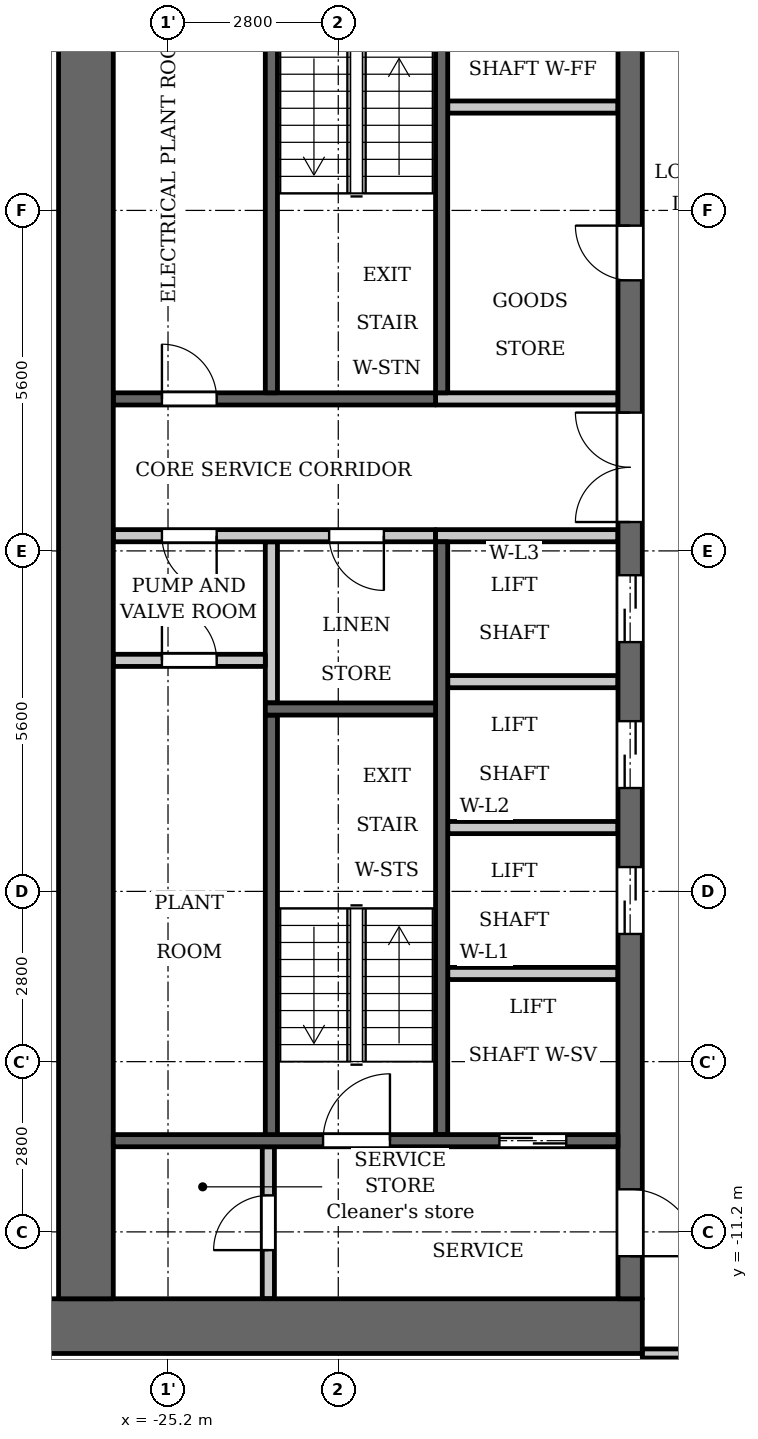
"""IFC4 building model, lengths in metres.
Left out: names, types, materials, properties, quantities, classifications, styles, units other than length and angle.
Written with IfcOpenShell. Run it as: python <this file> out.ifc"""

import sys

from ifc_helpers import new_model, si_unit, direction, frame, frame_2d, origin, place, context, subcontext, project, spatial, rectangle, extrude, element, fill, save


model = new_model("IFC4")
c1 = context("Model", 3, precision=1e-05, world=origin(), true_north=direction((0.0, 1.0)))
c2 = subcontext(c1, "Body", "Model", "MODEL_VIEW")
j1 = project(units=[si_unit("LENGTHUNIT", "METRE"), si_unit("PLANEANGLEUNIT", "RADIAN")], contexts=[c1])
p1 = place(None, origin())
s1 = spatial("IfcSite", under=j1, at=p1, CompositionType="ELEMENT")
p2 = place(p1, origin())
s2 = spatial("IfcBuilding", under=s1, at=p2, CompositionType="ELEMENT")
p3 = place(p2, frame((0.0, 0.0, 37.5)))
s3 = spatial("IfcBuildingStorey", under=s2, at=p3, CompositionType="ELEMENT", Elevation=37.5)
p4 = place(p3, frame((-23.5, -2.5, 0.0), z_axis=(0.0, 0.0, 1.0), x_axis=(0.0, 1.0, 0.0)))
e1 = element("IfcWall", 1, at=p4, inside=s3, PredefinedType="PARTITIONING", context=c2, shape_type="SweptSolid", body=[
    extrude(rectangle(XDim=2.65, YDim=0.2, at=frame_2d((1.325, 0.0))), origin(), (0.0, 0.0, 1.0), 3.2),
])
p5 = place(p3, frame((-20.7, 2.6, 0.0), z_axis=(0.0, 0.0, 1.0), x_axis=(0.0, 1.0, 0.0)))
e2 = element("IfcWall", 2, at=p5, inside=s3, PredefinedType="SHEAR", context=c2, shape_type="SweptSolid", body=[
    extrude(rectangle(XDim=7.0, YDim=0.2, at=frame_2d((3.5, 0.0))), origin(), (0.0, 0.0, 1.0), 3.2),
])
p6 = place(p3, frame((-20.7, -9.6, 0.0), z_axis=(0.0, 0.0, 1.0), x_axis=(0.0, 1.0, 0.0)))
e3 = element("IfcWall", 3, at=p6, inside=s3, PredefinedType="SHEAR", context=c2, shape_type="SweptSolid", body=[
    extrude(rectangle(XDim=9.75, YDim=0.2, at=frame_2d((4.875, 0.0))), origin(), (0.0, 0.0, 1.0), 3.2),
])
p7 = place(p3, frame((-20.8, 2.5, 0.0), z_axis=(0.0, 0.0, 1.0), x_axis=(-1.0, 0.0, 0.0)))
e4 = element("IfcWall", 4, at=p7, inside=s3, PredefinedType="SHEAR", context=c2, shape_type="SweptSolid", body=[
    extrude(rectangle(XDim=5.3, YDim=0.2, at=frame_2d((2.65, 0.0))), origin(), (0.0, 0.0, 1.0), 3.2),
])
p8 = place(p7, frame((3.6, 0.0, 0.0)))
e5 = element("IfcOpeningElement", 5, at=p8, cuts=e4, PredefinedType="OPENING", context=c2, shape_type="SweptSolid", body=[
    extrude(rectangle(XDim=0.9, YDim=2.1, at=frame_2d((0.45, 1.05))), frame((0.0, 0.11, 0.0), z_axis=(0.0, -1.0, 0.0), x_axis=(1.0, 0.0, 0.0)), (0.0, 0.0, 1.0), 0.22),
])
p9 = place(p3, frame((-20.8, 0.25, 0.0), z_axis=(0.0, 0.0, 1.0), x_axis=(-1.0, 0.0, 0.0)))
e6 = element("IfcWall", 6, at=p9, inside=s3, PredefinedType="PARTITIONING", context=c2, shape_type="SweptSolid", body=[
    extrude(rectangle(XDim=5.3, YDim=0.2, at=frame_2d((2.65, 0.0))), origin(), (0.0, 0.0, 1.0), 3.2),
])
p10 = place(p9, frame((0.85, 0.0, 0.0)))
e7 = element("IfcOpeningElement", 7, at=p10, cuts=e6, PredefinedType="OPENING", context=c2, shape_type="SweptSolid", body=[
    extrude(rectangle(XDim=0.9, YDim=2.1, at=frame_2d((0.45, 1.05))), frame((0.0, 0.11, 0.0), z_axis=(0.0, -1.0, 0.0), x_axis=(1.0, 0.0, 0.0)), (0.0, 0.0, 1.0), 0.22),
])
p11 = place(p9, frame((3.6, 0.0, 0.0)))
e8 = element("IfcOpeningElement", 8, at=p11, cuts=e6, PredefinedType="OPENING", context=c2, shape_type="SweptSolid", body=[
    extrude(rectangle(XDim=0.9, YDim=2.1, at=frame_2d((0.45, 1.05))), frame((0.0, 0.11, 0.0), z_axis=(0.0, -1.0, 0.0), x_axis=(1.0, 0.0, 0.0)), (0.0, 0.0, 1.0), 0.22),
])
p12 = place(p3, frame((-17.4, -12.75, 0.0), z_axis=(0.0, 0.0, 1.0), x_axis=(-1.0, 0.0, 0.0)))
e9 = element("IfcWall", 9, at=p12, inside=s3, PredefinedType="SHEAR", context=c2, shape_type="SweptSolid", body=[
    extrude(rectangle(XDim=10.4, YDim=0.9, at=frame_2d((5.2, 0.0))), origin(), (0.0, 0.0, 1.0), 3.2),
])
p13 = place(p3, frame((-17.6, -12.3, 0.0), z_axis=(0.0, 0.0, 1.0), x_axis=(0.0, 1.0, 0.0)))
e10 = element("IfcWall", 10, at=p13, inside=s3, PredefinedType="SHEAR", context=c2, shape_type="SweptSolid", body=[
    extrude(rectangle(XDim=24.6, YDim=0.4, at=frame_2d((12.3, 0.0))), origin(), (0.0, 0.0, 1.0), 3.2),
])
p14 = place(p13, frame((6.0, 0.0, 0.0)))
e11 = element("IfcOpeningElement", 11, at=p14, cuts=e10, PredefinedType="OPENING", context=c2, shape_type="SweptSolid", body=[
    extrude(rectangle(XDim=1.1, YDim=2.1, at=frame_2d((0.55, 1.05))), frame((0.0, 0.21, 0.0), z_axis=(0.0, -1.0, 0.0), x_axis=(1.0, 0.0, 0.0)), (0.0, 0.0, 1.0), 0.42),
])
p15 = place(p13, frame((8.4, 0.0, 0.0)))
e12 = element("IfcOpeningElement", 12, at=p15, cuts=e10, PredefinedType="OPENING", context=c2, shape_type="SweptSolid", body=[
    extrude(rectangle(XDim=1.1, YDim=2.1, at=frame_2d((0.55, 1.05))), frame((0.0, 0.21, 0.0), z_axis=(0.0, -1.0, 0.0), x_axis=(1.0, 0.0, 0.0)), (0.0, 0.0, 1.0), 0.42),
])
p16 = place(p13, frame((10.8, 0.0, 0.0)))
e13 = element("IfcOpeningElement", 13, at=p16, cuts=e10, PredefinedType="OPENING", context=c2, shape_type="SweptSolid", body=[
    extrude(rectangle(XDim=1.1, YDim=2.1, at=frame_2d((0.55, 1.05))), frame((0.0, 0.21, 0.0), z_axis=(0.0, -1.0, 0.0), x_axis=(1.0, 0.0, 0.0)), (0.0, 0.0, 1.0), 0.42),
])
p17 = place(p13, frame((16.75, 0.0, 0.0)))
e14 = element("IfcOpeningElement", 14, at=p17, cuts=e10, PredefinedType="OPENING", context=c2, shape_type="SweptSolid", body=[
    extrude(rectangle(XDim=0.9, YDim=2.1, at=frame_2d((0.45, 1.05))), frame((0.0, 0.21, 0.0), z_axis=(0.0, -1.0, 0.0), x_axis=(1.0, 0.0, 0.0)), (0.0, 0.0, 1.0), 0.42),
])
p18 = place(p13, frame((22.8, 0.0, 0.0)))
e15 = element("IfcOpeningElement", 15, at=p18, cuts=e10, PredefinedType="OPENING", context=c2, shape_type="SweptSolid", body=[
    extrude(rectangle(XDim=1.1, YDim=2.1, at=frame_2d((0.55, 1.05))), frame((0.0, 0.21, 0.0), z_axis=(0.0, -1.0, 0.0), x_axis=(1.0, 0.0, 0.0)), (0.0, 0.0, 1.0), 0.42),
])
p19 = place(p13, frame((0.7, 0.0, 0.0)))
e16 = element("IfcOpeningElement", 16, at=p19, cuts=e10, PredefinedType="OPENING", context=c2, shape_type="SweptSolid", body=[
    extrude(rectangle(XDim=1.1, YDim=2.1, at=frame_2d((0.55, 1.05))), frame((0.0, 0.21, 0.0), z_axis=(0.0, -1.0, 0.0), x_axis=(1.0, 0.0, 0.0)), (0.0, 0.0, 1.0), 0.42),
])
p20 = place(p13, frame((12.775, 0.0, 0.0)))
e17 = element("IfcOpeningElement", 17, at=p20, cuts=e10, PredefinedType="OPENING", context=c2, shape_type="SweptSolid", body=[
    extrude(rectangle(XDim=1.8, YDim=2.1, at=frame_2d((0.9, 1.05))), frame((0.0, 0.21, 0.0), z_axis=(0.0, -1.0, 0.0), x_axis=(1.0, 0.0, 0.0)), (0.0, 0.0, 1.0), 0.42),
])
p21 = place(p3, frame((-26.55, -12.3, 0.0), z_axis=(0.0, 0.0, 1.0), x_axis=(0.0, 1.0, 0.0)))
e18 = element("IfcWall", 18, at=p21, inside=s3, PredefinedType="SHEAR", context=c2, shape_type="SweptSolid", body=[
    extrude(rectangle(XDim=24.6, YDim=0.9, at=frame_2d((12.3, 0.0))), origin(), (0.0, 0.0, 1.0), 3.2),
])
p22 = place(p3, frame((-23.55, -12.3, 0.0), z_axis=(0.0, 0.0, 1.0), x_axis=(0.0, 1.0, 0.0)))
e19 = element("IfcWall", 19, at=p22, inside=s3, PredefinedType="PARTITIONING", context=c2, shape_type="SweptSolid", body=[
    extrude(rectangle(XDim=2.5, YDim=0.2, at=frame_2d((1.25, 0.0))), origin(), (0.0, 0.0, 1.0), 3.2),
])
p23 = place(p22, frame((0.8, 0.0, 0.0)))
e20 = element("IfcOpeningElement", 20, at=p23, cuts=e19, PredefinedType="OPENING", context=c2, shape_type="SweptSolid", body=[
    extrude(rectangle(XDim=0.9, YDim=2.1, at=frame_2d((0.45, 1.05))), frame((0.0, 0.11, 0.0), z_axis=(0.0, -1.0, 0.0), x_axis=(1.0, 0.0, 0.0)), (0.0, 0.0, 1.0), 0.22),
])
p24 = place(p3, frame((-23.6, -1.8, 0.0), z_axis=(0.0, 0.0, 1.0), x_axis=(-1.0, 0.0, 0.0)))
e21 = element("IfcWall", 21, at=p24, inside=s3, PredefinedType="PARTITIONING", context=c2, shape_type="SweptSolid", body=[
    extrude(rectangle(XDim=2.5, YDim=0.2, at=frame_2d((1.25, 0.0))), origin(), (0.0, 0.0, 1.0), 3.2),
])
p25 = place(p24, frame((0.8, 0.0, 0.0)))
e22 = element("IfcOpeningElement", 22, at=p25, cuts=e21, PredefinedType="OPENING", context=c2, shape_type="SweptSolid", body=[
    extrude(rectangle(XDim=0.9, YDim=2.1, at=frame_2d((0.45, 1.05))), frame((0.0, 0.11, 0.0), z_axis=(0.0, -1.0, 0.0), x_axis=(1.0, 0.0, 0.0)), (0.0, 0.0, 1.0), 0.22),
])
p26 = place(p3, frame((-17.8, -9.7, 0.0), z_axis=(0.0, 0.0, 1.0), x_axis=(-1.0, 0.0, 0.0)))
e23 = element("IfcWall", 23, at=p26, inside=s3, PredefinedType="SHEAR", context=c2, shape_type="SweptSolid", body=[
    extrude(rectangle(XDim=8.3, YDim=0.2, at=frame_2d((4.15, 0.0))), origin(), (0.0, 0.0, 1.0), 3.2),
])
p27 = place(p26, frame((0.85, 0.0, 0.0)))
e24 = element("IfcOpeningElement", 24, at=p27, cuts=e23, PredefinedType="OPENING", context=c2, shape_type="SweptSolid", body=[
    extrude(rectangle(XDim=1.1, YDim=2.1, at=frame_2d((0.55, 1.05))), frame((0.0, 0.11, 0.0), z_axis=(0.0, -1.0, 0.0), x_axis=(1.0, 0.0, 0.0)), (0.0, 0.0, 1.0), 0.22),
])
p28 = place(p26, frame((3.75, 0.0, 0.0)))
e25 = element("IfcOpeningElement", 25, at=p28, cuts=e23, PredefinedType="OPENING", context=c2, shape_type="SweptSolid", body=[
    extrude(rectangle(XDim=1.1, YDim=2.1, at=frame_2d((0.55, 1.05))), frame((0.0, 0.11, 0.0), z_axis=(0.0, -1.0, 0.0), x_axis=(1.0, 0.0, 0.0)), (0.0, 0.0, 1.0), 0.22),
])
for number, where, z_axis, x_axis in (
    (26, (-17.8, -6.95, 0.0), (0.0, 0.0, 1.0), (-1.0, 0.0, 0.0)),
    (27, (-17.8, -4.55, 0.0), (0.0, 0.0, 1.0), (-1.0, 0.0, 0.0)),
    (28, (-17.8, -2.15, 0.0), (0.0, 0.0, 1.0), (-1.0, 0.0, 0.0)),
):
    element("IfcWall", number, at=place(p3, frame(where, z_axis=z_axis, x_axis=x_axis)), inside=s3, PredefinedType="PARTITIONING", context=c2, shape_type="SweptSolid", body=[
        extrude(rectangle(XDim=2.8, YDim=0.2, at=frame_2d((1.4, 0.0))), origin(), (0.0, 0.0, 1.0), 3.2),
    ])
for number, where, z_axis, x_axis in (
    (29, (-17.8, 0.25, 0.0), (0.0, 0.0, 1.0), (-1.0, 0.0, 0.0)),
    (30, (-17.8, 2.5, 0.0), (0.0, 0.0, 1.0), (-1.0, 0.0, 0.0)),
):
    element("IfcWall", number, at=place(p3, frame(where, z_axis=z_axis, x_axis=x_axis)), inside=s3, PredefinedType="PARTITIONING", context=c2, shape_type="SweptSolid", body=[
        extrude(rectangle(XDim=3.0, YDim=0.2, at=frame_2d((1.5, 0.0))), origin(), (0.0, 0.0, 1.0), 3.2),
    ])
p29 = place(p3, frame((-17.8, 7.3, 0.0), z_axis=(0.0, 0.0, 1.0), x_axis=(-1.0, 0.0, 0.0)))
e31 = element("IfcWall", 31, at=p29, inside=s3, PredefinedType="PARTITIONING", context=c2, shape_type="SweptSolid", body=[
    extrude(rectangle(XDim=2.8, YDim=0.2, at=frame_2d((1.4, 0.0))), origin(), (0.0, 0.0, 1.0), 3.2),
])
p30 = place(p3, frame((-23.5, 2.6, 0.0), z_axis=(0.0, 0.0, 1.0), x_axis=(0.0, 1.0, 0.0)))
e32 = element("IfcWall", 32, at=p30, inside=s3, PredefinedType="SHEAR", context=c2, shape_type="SweptSolid", body=[
    extrude(rectangle(XDim=7.0, YDim=0.2, at=frame_2d((3.5, 0.0))), origin(), (0.0, 0.0, 1.0), 3.2),
])
p31 = place(p3, frame((-23.5, -9.6, 0.0), z_axis=(0.0, 0.0, 1.0), x_axis=(0.0, 1.0, 0.0)))
e33 = element("IfcWall", 33, at=p31, inside=s3, PredefinedType="SHEAR", context=c2, shape_type="SweptSolid", body=[
    extrude(rectangle(XDim=6.9, YDim=0.2, at=frame_2d((3.45, 0.0))), origin(), (0.0, 0.0, 1.0), 3.2),
])
p32 = place(p3, frame((-20.8, -2.6, 0.0), z_axis=(0.0, 0.0, 1.0), x_axis=(-1.0, 0.0, 0.0)))
e34 = element("IfcWall", 34, at=p32, inside=s3, PredefinedType="SHEAR", context=c2, shape_type="SweptSolid", body=[
    extrude(rectangle(XDim=2.8, YDim=0.2, at=frame_2d((1.4, 0.0))), origin(), (0.0, 0.0, 1.0), 3.2),
])
p33 = place(p3, frame((-17.4, -13.2, 0.0), z_axis=(0.0, 0.0, 1.0), x_axis=(1.0, 0.0, 0.0)))
e35 = element("IfcWall", 35, at=p33, inside=s3, PredefinedType="PARTITIONING", context=c2, shape_type="SweptSolid", body=[
    extrude(rectangle(XDim=34.8, YDim=0.15, at=frame_2d((17.4, 0.0))), origin(), (0.0, 0.0, 1.0), 3.2),
])
p34 = place(p33, frame((0.65, 0.0, 0.0)))
e36 = element("IfcOpeningElement", 36, at=p34, cuts=e35, PredefinedType="OPENING", context=c2, shape_type="SweptSolid", body=[
    extrude(rectangle(XDim=1.0, YDim=2.1, at=frame_2d((0.5, 1.05))), frame((0.0, 0.085, 0.0), z_axis=(0.0, -1.0, 0.0), x_axis=(1.0, 0.0, 0.0)), (0.0, 0.0, 1.0), 0.17),
])
p35 = place(p33, frame((33.05, 0.0, 0.0)))
e37 = element("IfcOpeningElement", 37, at=p35, cuts=e35, PredefinedType="OPENING", context=c2, shape_type="SweptSolid", body=[
    extrude(rectangle(XDim=1.0, YDim=2.1, at=frame_2d((0.5, 1.05))), frame((0.0, 0.085, 0.0), z_axis=(0.0, -1.0, 0.0), x_axis=(1.0, 0.0, 0.0)), (0.0, 0.0, 1.0), 0.17),
])
p36 = place(p33, frame((4.55, 0.0, 0.0)))
e38 = element("IfcOpeningElement", 38, at=p36, cuts=e35, PredefinedType="OPENING", context=c2, shape_type="SweptSolid", body=[
    extrude(rectangle(XDim=1.0, YDim=2.1, at=frame_2d((0.5, 1.05))), frame((0.0, 0.085, 0.0), z_axis=(0.0, -1.0, 0.0), x_axis=(1.0, 0.0, 0.0)), (0.0, 0.0, 1.0), 0.17),
])
p37 = place(p33, frame((6.9, 0.0, 0.0)))
e39 = element("IfcOpeningElement", 39, at=p37, cuts=e35, PredefinedType="OPENING", context=c2, shape_type="SweptSolid", body=[
    extrude(rectangle(XDim=1.0, YDim=2.1, at=frame_2d((0.5, 1.05))), frame((0.0, 0.085, 0.0), z_axis=(0.0, -1.0, 0.0), x_axis=(1.0, 0.0, 0.0)), (0.0, 0.0, 1.0), 0.17),
])
p38 = place(p33, frame((15.75, 0.0, 0.0)))
e40 = element("IfcOpeningElement", 40, at=p38, cuts=e35, PredefinedType="OPENING", context=c2, shape_type="SweptSolid", body=[
    extrude(rectangle(XDim=1.0, YDim=2.1, at=frame_2d((0.5, 1.05))), frame((0.0, 0.085, 0.0), z_axis=(0.0, -1.0, 0.0), x_axis=(1.0, 0.0, 0.0)), (0.0, 0.0, 1.0), 0.17),
])
p39 = place(p33, frame((18.1, 0.0, 0.0)))
e41 = element("IfcOpeningElement", 41, at=p39, cuts=e35, PredefinedType="OPENING", context=c2, shape_type="SweptSolid", body=[
    extrude(rectangle(XDim=1.0, YDim=2.1, at=frame_2d((0.5, 1.05))), frame((0.0, 0.085, 0.0), z_axis=(0.0, -1.0, 0.0), x_axis=(1.0, 0.0, 0.0)), (0.0, 0.0, 1.0), 0.17),
])
p40 = place(p33, frame((26.95, 0.0, 0.0)))
e42 = element("IfcOpeningElement", 42, at=p40, cuts=e35, PredefinedType="OPENING", context=c2, shape_type="SweptSolid", body=[
    extrude(rectangle(XDim=1.0, YDim=2.1, at=frame_2d((0.5, 1.05))), frame((0.0, 0.085, 0.0), z_axis=(0.0, -1.0, 0.0), x_axis=(1.0, 0.0, 0.0)), (0.0, 0.0, 1.0), 0.17),
])
p41 = place(p33, frame((29.25, 0.0, 0.0)))
e43 = element("IfcOpeningElement", 43, at=p41, cuts=e35, PredefinedType="OPENING", context=c2, shape_type="SweptSolid", body=[
    extrude(rectangle(XDim=1.0, YDim=2.1, at=frame_2d((0.5, 1.05))), frame((0.0, 0.085, 0.0), z_axis=(0.0, -1.0, 0.0), x_axis=(1.0, 0.0, 0.0)), (0.0, 0.0, 1.0), 0.17),
])
p42 = place(p27, origin())
e44 = element("IfcDoor", 44, at=p42, inside=s3, OperationType="DOUBLE_DOOR_SLIDING", PredefinedType="DOOR", context=c2, shape_type="SweptSolid", body=[
    extrude(rectangle(XDim=1.1, YDim=2.1, at=frame_2d((0.55, 1.05))), frame((0.0, 0.025, 0.0), z_axis=(0.0, -1.0, 0.0), x_axis=(1.0, 0.0, 0.0)), (0.0, 0.0, 1.0), 0.05),
])
fill(e24, e44)
p43 = place(p14, origin())
e45 = element("IfcDoor", 45, at=p43, inside=s3, OperationType="DOUBLE_DOOR_SLIDING", PredefinedType="DOOR", context=c2, shape_type="SweptSolid", body=[
    extrude(rectangle(XDim=1.1, YDim=2.1, at=frame_2d((0.55, 1.05))), frame((0.0, 0.025, 0.0), z_axis=(0.0, -1.0, 0.0), x_axis=(1.0, 0.0, 0.0)), (0.0, 0.0, 1.0), 0.05),
])
fill(e11, e45)
p44 = place(p15, origin())
e46 = element("IfcDoor", 46, at=p44, inside=s3, OperationType="DOUBLE_DOOR_SLIDING", PredefinedType="DOOR", context=c2, shape_type="SweptSolid", body=[
    extrude(rectangle(XDim=1.1, YDim=2.1, at=frame_2d((0.55, 1.05))), frame((0.0, 0.025, 0.0), z_axis=(0.0, -1.0, 0.0), x_axis=(1.0, 0.0, 0.0)), (0.0, 0.0, 1.0), 0.05),
])
fill(e12, e46)
p45 = place(p16, origin())
e47 = element("IfcDoor", 47, at=p45, inside=s3, OperationType="DOUBLE_DOOR_SLIDING", PredefinedType="DOOR", context=c2, shape_type="SweptSolid", body=[
    extrude(rectangle(XDim=1.1, YDim=2.1, at=frame_2d((0.55, 1.05))), frame((0.0, 0.025, 0.0), z_axis=(0.0, -1.0, 0.0), x_axis=(1.0, 0.0, 0.0)), (0.0, 0.0, 1.0), 0.05),
])
fill(e13, e47)
p46 = place(p17, origin())
e48 = element("IfcDoor", 48, at=p46, inside=s3, OperationType="SINGLE_SWING_LEFT", PredefinedType="DOOR", context=c2, shape_type="SweptSolid", body=[
    extrude(rectangle(XDim=0.9, YDim=2.1, at=frame_2d((0.45, 1.05))), frame((0.0, 0.025, 0.0), z_axis=(0.0, -1.0, 0.0), x_axis=(1.0, 0.0, 0.0)), (0.0, 0.0, 1.0), 0.05),
])
fill(e14, e48)
p47 = place(p19, origin())
e49 = element("IfcDoor", 49, at=p47, inside=s3, OperationType="SINGLE_SWING_LEFT", PredefinedType="DOOR", context=c2, shape_type="SweptSolid", body=[
    extrude(rectangle(XDim=1.1, YDim=2.1, at=frame_2d((0.55, 1.05))), frame((0.0, 0.025, 0.0), z_axis=(0.0, -1.0, 0.0), x_axis=(1.0, 0.0, 0.0)), (0.0, 0.0, 1.0), 0.05),
])
fill(e16, e49)
p48 = place(p23, origin())
e50 = element("IfcDoor", 50, at=p48, inside=s3, OperationType="SINGLE_SWING_RIGHT", PredefinedType="DOOR", context=c2, shape_type="SweptSolid", body=[
    extrude(rectangle(XDim=0.9, YDim=2.1, at=frame_2d((0.45, 1.05))), frame((0.0, 0.025, 0.0), z_axis=(0.0, -1.0, 0.0), x_axis=(1.0, 0.0, 0.0)), (0.0, 0.0, 1.0), 0.05),
])
fill(e20, e50)
p49 = place(p28, origin())
e51 = element("IfcDoor", 51, at=p49, inside=s3, OperationType="SINGLE_SWING_LEFT", PredefinedType="DOOR", context=c2, shape_type="SweptSolid", body=[
    extrude(rectangle(XDim=1.1, YDim=2.1, at=frame_2d((0.55, 1.05))), frame((0.0, 0.025, 0.0), z_axis=(0.0, -1.0, 0.0), x_axis=(1.0, 0.0, 0.0)), (0.0, 0.0, 1.0), 0.05),
])
fill(e25, e51)
p50 = place(p20, origin())
e52 = element("IfcDoor", 52, at=p50, inside=s3, OperationType="DOUBLE_DOOR_SINGLE_SWING", PredefinedType="DOOR", context=c2, shape_type="SweptSolid", body=[
    extrude(rectangle(XDim=1.8, YDim=2.1, at=frame_2d((0.9, 1.05))), frame((0.0, 0.025, 0.0), z_axis=(0.0, -1.0, 0.0), x_axis=(1.0, 0.0, 0.0)), (0.0, 0.0, 1.0), 0.05),
])
fill(e17, e52)
p51 = place(p10, origin())
e53 = element("IfcDoor", 53, at=p51, inside=s3, OperationType="SINGLE_SWING_RIGHT", PredefinedType="DOOR", context=c2, shape_type="SweptSolid", body=[
    extrude(rectangle(XDim=0.9, YDim=2.1, at=frame_2d((0.45, 1.05))), frame((0.0, 0.025, 0.0), z_axis=(0.0, -1.0, 0.0), x_axis=(1.0, 0.0, 0.0)), (0.0, 0.0, 1.0), 0.05),
])
fill(e7, e53)
p52 = place(p25, origin())
e54 = element("IfcDoor", 54, at=p52, inside=s3, OperationType="SINGLE_SWING_RIGHT", PredefinedType="DOOR", context=c2, shape_type="SweptSolid", body=[
    extrude(rectangle(XDim=0.9, YDim=2.1, at=frame_2d((0.45, 1.05))), frame((0.0, 0.025, 0.0), z_axis=(0.0, -1.0, 0.0), x_axis=(1.0, 0.0, 0.0)), (0.0, 0.0, 1.0), 0.05),
])
fill(e22, e54)
p53 = place(p11, origin())
e55 = element("IfcDoor", 55, at=p53, inside=s3, OperationType="SINGLE_SWING_RIGHT", PredefinedType="DOOR", context=c2, shape_type="SweptSolid", body=[
    extrude(rectangle(XDim=0.9, YDim=2.1, at=frame_2d((0.45, 1.05))), frame((0.0, 0.025, 0.0), z_axis=(0.0, -1.0, 0.0), x_axis=(1.0, 0.0, 0.0)), (0.0, 0.0, 1.0), 0.05),
])
fill(e8, e55)
p54 = place(p8, origin())
e56 = element("IfcDoor", 56, at=p54, inside=s3, OperationType="SINGLE_SWING_RIGHT", PredefinedType="DOOR", context=c2, shape_type="SweptSolid", body=[
    extrude(rectangle(XDim=0.9, YDim=2.1, at=frame_2d((0.45, 1.05))), frame((0.0, 0.025, 0.0), z_axis=(0.0, -1.0, 0.0), x_axis=(1.0, 0.0, 0.0)), (0.0, 0.0, 1.0), 0.05),
])
fill(e5, e56)
save(model, sys.argv[1])
